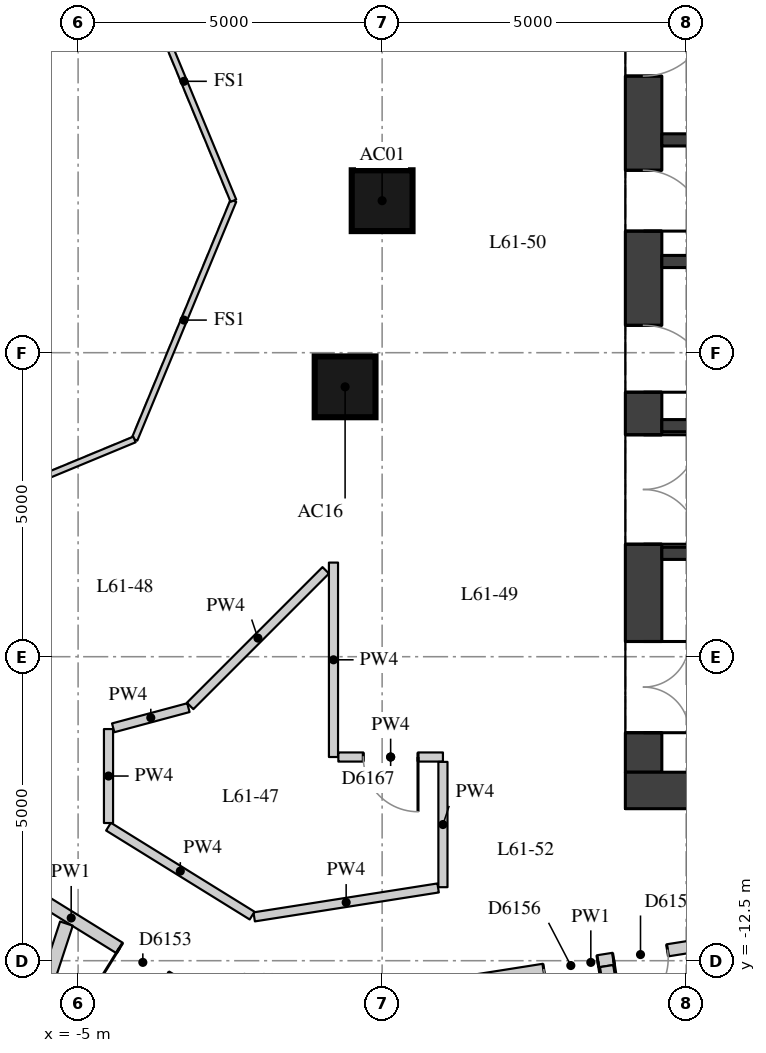
"""IFC4 building model, lengths in metres.
Left out: names, types, materials, properties, quantities, classifications, styles, units other than length and angle.
Written with IfcOpenShell. Run it as: python <this file> out.ifc"""

import sys

from ifc_helpers import new_model, si_unit, direction, frame, frame_2d, origin, origin_2d, place, context, subcontext, project, spatial, rectangle, extrude, element, fill, save


model = new_model("IFC4")
c1 = context("Model", 3, precision=1e-05, world=origin(), true_north=direction((0.0, 1.0)))
c2 = subcontext(c1, "Body", "Model", "MODEL_VIEW")
j1 = project(units=[si_unit("LENGTHUNIT", "METRE"), si_unit("PLANEANGLEUNIT", "RADIAN")], contexts=[c1])
p1 = place(None, origin())
s1 = spatial("IfcSite", under=j1, at=p1, CompositionType="ELEMENT")
p2 = place(p1, origin())
s2 = spatial("IfcBuilding", under=s1, at=p2, CompositionType="ELEMENT")
p3 = place(p2, frame((0.0, 0.0, 215.6)))
s3 = spatial("IfcBuildingStorey", under=s2, at=p3, CompositionType="ELEMENT", Elevation=215.6)
for number, where, z_axis, x_axis in (
    (1, (0.0, 0.0, 0.0), (0.0, 0.0, 1.0), (1.0, 0.0, 0.0)),
    (2, (-0.609, -3.062, 0.0), (0.0, 0.0, 1.0), (1.0, 0.0, 0.0)),
):
    element("IfcColumn", number, at=place(p3, frame(where, z_axis=z_axis, x_axis=x_axis)), inside=s3, PredefinedType="COLUMN", context=c2, shape_type="SweptSolid", body=[
        extrude(rectangle(XDim=1.0, YDim=1.0, at=origin_2d()), origin(), (0.0, 0.0, 1.0), 3.3),
    ])
p4 = place(p3, frame((4.3, -9.4, 0.0), z_axis=(0.0, 0.0, 1.0), x_axis=(0.0, 1.0, 0.0)))
e3 = element("IfcWall", 3, at=p4, inside=s3, PredefinedType="SHEAR", context=c2, shape_type="SweptSolid", body=[
    extrude(rectangle(XDim=18.8, YDim=0.6, at=frame_2d((9.4, 0.0))), origin(), (0.0, 0.0, 1.0), 3.02),
])
p5 = place(p4, frame((0.65, 0.0, 0.0)))
e4 = element("IfcOpeningElement", 4, at=p5, cuts=e3, PredefinedType="OPENING", context=c2, shape_type="SweptSolid", body=[
    extrude(rectangle(XDim=1.5, YDim=2.1, at=frame_2d((0.75, 1.05))), frame((0.0, 0.31, 0.0), z_axis=(0.0, -1.0, 0.0), x_axis=(1.0, 0.0, 0.0)), (0.0, 0.0, 1.0), 0.62),
])
p6 = place(p4, frame((3.75, 0.0, 0.0)))
e5 = element("IfcOpeningElement", 5, at=p6, cuts=e3, PredefinedType="OPENING", context=c2, shape_type="SweptSolid", body=[
    extrude(rectangle(XDim=1.8, YDim=2.1, at=frame_2d((0.9, 1.05))), frame((0.0, 0.31, 0.0), z_axis=(0.0, -1.0, 0.0), x_axis=(1.0, 0.0, 0.0)), (0.0, 0.0, 1.0), 0.62),
])
p7 = place(p4, frame((6.25, 0.0, 0.0)))
e6 = element("IfcOpeningElement", 6, at=p7, cuts=e3, PredefinedType="OPENING", context=c2, shape_type="SweptSolid", body=[
    extrude(rectangle(XDim=1.1, YDim=2.1, at=frame_2d((0.55, 1.05))), frame((0.0, 0.31, 0.0), z_axis=(0.0, -1.0, 0.0), x_axis=(1.0, 0.0, 0.0)), (0.0, 0.0, 1.0), 0.62),
])
p8 = place(p4, frame((8.9, 0.0, 0.0)))
e7 = element("IfcOpeningElement", 7, at=p8, cuts=e3, PredefinedType="OPENING", context=c2, shape_type="SweptSolid", body=[
    extrude(rectangle(XDim=1.0, YDim=2.1, at=frame_2d((0.5, 1.05))), frame((0.0, 0.31, 0.0), z_axis=(0.0, -1.0, 0.0), x_axis=(1.0, 0.0, 0.0)), (0.0, 0.0, 1.0), 0.62),
])
p9 = place(p4, frame((11.45, 0.0, 0.0)))
e8 = element("IfcOpeningElement", 8, at=p9, cuts=e3, PredefinedType="OPENING", context=c2, shape_type="SweptSolid", body=[
    extrude(rectangle(XDim=1.1, YDim=2.1, at=frame_2d((0.55, 1.05))), frame((0.0, 0.31, 0.0), z_axis=(0.0, -1.0, 0.0), x_axis=(1.0, 0.0, 0.0)), (0.0, 0.0, 1.0), 0.62),
])
p10 = place(p4, frame((13.25, 0.0, 0.0)))
e9 = element("IfcOpeningElement", 9, at=p10, cuts=e3, PredefinedType="OPENING", context=c2, shape_type="SweptSolid", body=[
    extrude(rectangle(XDim=1.8, YDim=2.1, at=frame_2d((0.9, 1.05))), frame((0.0, 0.31, 0.0), z_axis=(0.0, -1.0, 0.0), x_axis=(1.0, 0.0, 0.0)), (0.0, 0.0, 1.0), 0.62),
])
p11 = place(p4, frame((16.65, 0.0, 0.0)))
e10 = element("IfcOpeningElement", 10, at=p11, cuts=e3, PredefinedType="OPENING", context=c2, shape_type="SweptSolid", body=[
    extrude(rectangle(XDim=1.5, YDim=2.1, at=frame_2d((0.75, 1.05))), frame((0.0, 0.31, 0.0), z_axis=(0.0, -1.0, 0.0), x_axis=(1.0, 0.0, 0.0)), (0.0, 0.0, 1.0), 0.62),
])
p12 = place(p3, frame((4.0, -9.7, 0.0), z_axis=(0.0, 0.0, 1.0), x_axis=(1.0, 0.0, 0.0)))
e11 = element("IfcWall", 11, at=p12, inside=s3, PredefinedType="SHEAR", context=c2, shape_type="SweptSolid", body=[
    extrude(rectangle(XDim=12.0, YDim=0.6, at=frame_2d((6.0, 0.0))), origin(), (0.0, 0.0, 1.0), 3.02),
])
for number, where, z_axis, x_axis in (
    (12, (4.6, 1.0, 0.0), (0.0, 0.0, 1.0), (1.0, 0.0, 0.0)),
    (13, (4.6, -1.0, 0.0), (0.0, 0.0, 1.0), (1.0, 0.0, 0.0)),
):
    element("IfcWall", number, at=place(p3, frame(where, z_axis=z_axis, x_axis=x_axis)), inside=s3, PredefinedType="SHEAR", context=c2, shape_type="SweptSolid", body=[
        extrude(rectangle(XDim=10.8, YDim=0.2, at=frame_2d((5.4, 0.0))), origin(), (0.0, 0.0, 1.0), 3.02),
    ])
p13 = place(p3, frame((4.6, -3.7, 0.0), z_axis=(0.0, 0.0, 1.0), x_axis=(1.0, 0.0, 0.0)))
e14 = element("IfcWall", 14, at=p13, inside=s3, PredefinedType="SHEAR", context=c2, shape_type="SweptSolid", body=[
    extrude(rectangle(XDim=10.8, YDim=0.2, at=frame_2d((5.4, 0.0))), origin(), (0.0, 0.0, 1.0), 3.02),
])
p14 = place(p13, frame((6.6, 0.0, 0.0)))
e15 = element("IfcOpeningElement", 15, at=p14, cuts=e14, PredefinedType="OPENING", context=c2, shape_type="SweptSolid", body=[
    extrude(rectangle(XDim=1.1, YDim=2.1, at=frame_2d((0.55, 1.05))), frame((0.0, 0.11, 0.0), z_axis=(0.0, -1.0, 0.0), x_axis=(1.0, 0.0, 0.0)), (0.0, 0.0, 1.0), 0.22),
])
p15 = place(p13, frame((8.9, 0.0, 0.0)))
e16 = element("IfcOpeningElement", 16, at=p15, cuts=e14, PredefinedType="OPENING", context=c2, shape_type="SweptSolid", body=[
    extrude(rectangle(XDim=1.1, YDim=2.1, at=frame_2d((0.55, 1.05))), frame((0.0, 0.11, 0.0), z_axis=(0.0, -1.0, 0.0), x_axis=(1.0, 0.0, 0.0)), (0.0, 0.0, 1.0), 0.22),
])
p16 = place(p3, frame((4.6, -5.8, 0.0), z_axis=(0.0, 0.0, 1.0), x_axis=(1.0, 0.0, 0.0)))
e17 = element("IfcWall", 17, at=p16, inside=s3, PredefinedType="SHEAR", context=c2, shape_type="SweptSolid", body=[
    extrude(rectangle(XDim=10.8, YDim=0.2, at=frame_2d((5.4, 0.0))), origin(), (0.0, 0.0, 1.0), 3.02),
])
p17 = place(p3, frame((9.306, -11.603, 0.0), z_axis=(0.0, 0.0, 1.0), x_axis=(-0.987842562114, -0.155457622769, 0.0)))
e18 = element("IfcWall", 18, at=p17, inside=s3, PredefinedType="PARTITIONING", context=c2, shape_type="SweptSolid", body=[
    extrude(rectangle(XDim=11.893, YDim=0.2, at=frame_2d((5.947, 0.0))), origin(), (0.0, 0.0, 1.0), 3.02),
])
p18 = place(p17, frame((10.607, 0.0, 0.0)))
e19 = element("IfcOpeningElement", 19, at=p18, cuts=e18, PredefinedType="OPENING", context=c2, shape_type="SweptSolid", body=[
    extrude(rectangle(XDim=0.9, YDim=2.1, at=frame_2d((0.45, 1.05))), frame((0.0, 0.11, 0.0), z_axis=(0.0, -1.0, 0.0), x_axis=(1.0, 0.0, 0.0)), (0.0, 0.0, 1.0), 0.22),
])
p19 = place(p17, frame((5.829, 0.0, 0.0)))
e20 = element("IfcOpeningElement", 20, at=p19, cuts=e18, PredefinedType="OPENING", context=c2, shape_type="SweptSolid", body=[
    extrude(rectangle(XDim=0.9, YDim=2.1, at=frame_2d((0.45, 1.05))), frame((0.0, 0.11, 0.0), z_axis=(0.0, -1.0, 0.0), x_axis=(1.0, 0.0, 0.0)), (0.0, 0.0, 1.0), 0.22),
])
p20 = place(p17, frame((4.669, 0.0, 0.0)))
e21 = element("IfcOpeningElement", 21, at=p20, cuts=e18, PredefinedType="OPENING", context=c2, shape_type="SweptSolid", body=[
    extrude(rectangle(XDim=0.9, YDim=2.1, at=frame_2d((0.45, 1.05))), frame((0.0, 0.11, 0.0), z_axis=(0.0, -1.0, 0.0), x_axis=(1.0, 0.0, 0.0)), (0.0, 0.0, 1.0), 0.22),
])
p21 = place(p17, frame((0.14, 0.0, 0.0)))
e22 = element("IfcOpeningElement", 22, at=p21, cuts=e18, PredefinedType="OPENING", context=c2, shape_type="SweptSolid", body=[
    extrude(rectangle(XDim=1.1, YDim=2.1, at=frame_2d((0.55, 1.05))), frame((0.0, 0.11, 0.0), z_axis=(0.0, -1.0, 0.0), x_axis=(1.0, 0.0, 0.0)), (0.0, 0.0, 1.0), 0.22),
])
p22 = place(p3, frame((-2.528, -13.4, 0.0), z_axis=(0.0, 0.0, 1.0), x_axis=(-0.850088088191, 0.526640524757, 0.0)))
e23 = element("IfcWall", 23, at=p22, inside=s3, PredefinedType="PARTITIONING", context=c2, shape_type="SweptSolid", body=[
    extrude(rectangle(XDim=6.084, YDim=0.2, at=frame_2d((3.042, 0.0))), origin(), (0.0, 0.0, 1.0), 3.02),
])
p23 = place(p22, frame((4.031, 0.0, 0.0)))
e24 = element("IfcOpeningElement", 24, at=p23, cuts=e23, PredefinedType="OPENING", context=c2, shape_type="SweptSolid", body=[
    extrude(rectangle(XDim=1.1, YDim=2.1, at=frame_2d((0.55, 1.05))), frame((0.0, 0.11, 0.0), z_axis=(0.0, -1.0, 0.0), x_axis=(1.0, 0.0, 0.0)), (0.0, 0.0, 1.0), 0.22),
])
p24 = place(p22, frame((1.206, 0.0, 0.0)))
e25 = element("IfcOpeningElement", 25, at=p24, cuts=e23, PredefinedType="OPENING", context=c2, shape_type="SweptSolid", body=[
    extrude(rectangle(XDim=0.9, YDim=2.1, at=frame_2d((0.45, 1.05))), frame((0.0, 0.11, 0.0), z_axis=(0.0, -1.0, 0.0), x_axis=(1.0, 0.0, 0.0)), (0.0, 0.0, 1.0), 0.22),
])
p25 = place(p3, frame((-0.8, -5.952, 0.0), z_axis=(0.0, 0.0, 1.0), x_axis=(0.0, -1.0, 0.0)))
e26 = element("IfcWall", 26, at=p25, inside=s3, PredefinedType="PARTITIONING", context=c2, shape_type="SweptSolid", body=[
    extrude(rectangle(XDim=3.198, YDim=0.15, at=frame_2d((1.599, 0.0))), origin(), (0.0, 0.0, 1.0), 3.02),
])
p26 = place(p3, frame((-0.72, -9.15, 0.0), z_axis=(0.0, 0.0, 1.0), x_axis=(1.0, 0.0, 0.0)))
e27 = element("IfcWall", 27, at=p26, inside=s3, PredefinedType="PARTITIONING", context=c2, shape_type="SweptSolid", body=[
    extrude(rectangle(XDim=1.72, YDim=0.15, at=frame_2d((0.86, 0.0))), origin(), (0.0, 0.0, 1.0), 3.02),
])
p27 = place(p26, frame((0.41, 0.0, 0.0)))
e28 = element("IfcOpeningElement", 28, at=p27, cuts=e27, PredefinedType="OPENING", context=c2, shape_type="SweptSolid", body=[
    extrude(rectangle(XDim=0.9, YDim=2.1, at=frame_2d((0.45, 1.05))), frame((0.0, 0.085, 0.0), z_axis=(0.0, -1.0, 0.0), x_axis=(1.0, 0.0, 0.0)), (0.0, 0.0, 1.0), 0.17),
])
p28 = place(p3, frame((1.0, -9.23, 0.0), z_axis=(0.0, 0.0, 1.0), x_axis=(0.0, -1.0, 0.0)))
e29 = element("IfcWall", 29, at=p28, inside=s3, PredefinedType="PARTITIONING", context=c2, shape_type="SweptSolid", body=[
    extrude(rectangle(XDim=2.061, YDim=0.15, at=frame_2d((1.03, 0.0))), origin(), (0.0, 0.0, 1.0), 3.02),
])
p29 = place(p3, frame((0.921, -11.303, 0.0), z_axis=(0.0, 0.0, 1.0), x_axis=(-0.987854584084, -0.15538121091, 0.0)))
e30 = element("IfcWall", 30, at=p29, inside=s3, PredefinedType="PARTITIONING", context=c2, shape_type="SweptSolid", body=[
    extrude(rectangle(XDim=3.062, YDim=0.15, at=frame_2d((1.531, 0.0))), origin(), (0.0, 0.0, 1.0), 3.02),
])
p30 = place(p3, frame((-2.138, -11.758, 0.0), z_axis=(0.0, 0.0, 1.0), x_axis=(-0.850109654363, 0.526605711666, 0.0)))
e31 = element("IfcWall", 31, at=p30, inside=s3, PredefinedType="PARTITIONING", context=c2, shape_type="SweptSolid", body=[
    extrude(rectangle(XDim=2.778, YDim=0.15, at=frame_2d((1.389, 0.0))), origin(), (0.0, 0.0, 1.0), 3.02),
])
p31 = place(p3, frame((-4.5, -10.235, 0.0), z_axis=(0.0, 0.0, 1.0), x_axis=(0.0, 1.0, 0.0)))
e32 = element("IfcWall", 32, at=p31, inside=s3, PredefinedType="PARTITIONING", context=c2, shape_type="SweptSolid", body=[
    extrude(rectangle(XDim=1.545, YDim=0.15, at=frame_2d((0.772, 0.0))), origin(), (0.0, 0.0, 1.0), 3.02),
])
p32 = place(p3, frame((-4.423, -8.67, 0.0), z_axis=(0.0, 0.0, 1.0), x_axis=(0.965898680525, 0.258920333232, 0.0)))
e33 = element("IfcWall", 33, at=p32, inside=s3, PredefinedType="PARTITIONING", context=c2, shape_type="SweptSolid", body=[
    extrude(rectangle(XDim=1.281, YDim=0.15, at=frame_2d((0.64, 0.0))), origin(), (0.0, 0.0, 1.0), 3.02),
])
p33 = place(p3, frame((-3.158, -8.31, 0.0), z_axis=(0.0, 0.0, 1.0), x_axis=(0.707106781187, 0.707106781187, 0.0)))
e34 = element("IfcWall", 34, at=p33, inside=s3, PredefinedType="PARTITIONING", context=c2, shape_type="SweptSolid", body=[
    extrude(rectangle(XDim=3.154, YDim=0.15, at=frame_2d((1.577, 0.0))), origin(), (0.0, 0.0, 1.0), 3.02),
])
p34 = place(p3, frame((-7.508, -18.944, 0.0), z_axis=(0.0, 0.0, 1.0), x_axis=(0.311962912662, 0.950094280124, 0.0)))
e35 = element("IfcWall", 35, at=p34, inside=s3, PredefinedType="PARTITIONING", context=c2, shape_type="SweptSolid", body=[
    extrude(rectangle(XDim=7.425, YDim=0.22, at=frame_2d((3.712, 0.0))), origin(), (0.0, 0.0, 1.0), 3.02),
])
p35 = place(p3, frame((5.071, -21.256, 0.0), z_axis=(0.0, 0.0, 1.0), x_axis=(-0.157132312818, 0.987577559622, 0.0)))
e36 = element("IfcWall", 36, at=p35, inside=s3, PredefinedType="PARTITIONING", context=c2, shape_type="SweptSolid", body=[
    extrude(rectangle(XDim=8.777, YDim=0.22, at=frame_2d((4.389, 0.0))), origin(), (0.0, 0.0, 1.0), 3.02),
])
for number, where, z_axis, x_axis in (
    (37, (-2.446, 0.0, 0.0), (0.0, 0.0, 1.0), (-0.383, -0.924, 0.0)),
    (38, (-4.073, -3.927, 0.0), (0.0, 0.0, 1.0), (-0.924, -0.383, 0.0)),
    (39, (-4.073, 3.927, 0.0), (0.0, 0.0, 1.0), (0.383, -0.924, 0.0)),
):
    element("IfcWall", number, at=place(p3, frame(where, z_axis=z_axis, x_axis=x_axis)), inside=s3, PredefinedType="PARTITIONING", context=c2, shape_type="SweptSolid", body=[
        extrude(rectangle(XDim=4.251, YDim=0.1, at=frame_2d((2.125, 0.0))), origin(), (0.0, 0.0, 1.0), 3.02),
    ])
p36 = place(p5, origin())
e40 = element("IfcDoor", 40, at=p36, inside=s3, OperationType="DOUBLE_DOOR_SINGLE_SWING", PredefinedType="DOOR", context=c2, shape_type="SweptSolid", body=[
    extrude(rectangle(XDim=1.5, YDim=2.1, at=frame_2d((0.75, 1.05))), frame((0.0, 0.025, 0.0), z_axis=(0.0, -1.0, 0.0), x_axis=(1.0, 0.0, 0.0)), (0.0, 0.0, 1.0), 0.05),
])
fill(e4, e40)
p37 = place(p6, origin())
e41 = element("IfcDoor", 41, at=p37, inside=s3, OperationType="DOUBLE_DOOR_SINGLE_SWING", PredefinedType="DOOR", context=c2, shape_type="SweptSolid", body=[
    extrude(rectangle(XDim=1.8, YDim=2.1, at=frame_2d((0.9, 1.05))), frame((0.0, 0.025, 0.0), z_axis=(0.0, -1.0, 0.0), x_axis=(1.0, 0.0, 0.0)), (0.0, 0.0, 1.0), 0.05),
])
fill(e5, e41)
p38 = place(p7, origin())
e42 = element("IfcDoor", 42, at=p38, inside=s3, OperationType="SINGLE_SWING_RIGHT", PredefinedType="DOOR", context=c2, shape_type="SweptSolid", body=[
    extrude(rectangle(XDim=1.1, YDim=2.1, at=frame_2d((0.55, 1.05))), frame((0.0, 0.025, 0.0), z_axis=(0.0, -1.0, 0.0), x_axis=(1.0, 0.0, 0.0)), (0.0, 0.0, 1.0), 0.05),
])
fill(e6, e42)
p39 = place(p8, origin())
e43 = element("IfcDoor", 43, at=p39, inside=s3, OperationType="SINGLE_SWING_RIGHT", PredefinedType="DOOR", context=c2, shape_type="SweptSolid", body=[
    extrude(rectangle(XDim=1.0, YDim=2.1, at=frame_2d((0.5, 1.05))), frame((0.0, 0.025, 0.0), z_axis=(0.0, -1.0, 0.0), x_axis=(1.0, 0.0, 0.0)), (0.0, 0.0, 1.0), 0.05),
])
fill(e7, e43)
p40 = place(p9, origin())
e44 = element("IfcDoor", 44, at=p40, inside=s3, OperationType="SINGLE_SWING_LEFT", PredefinedType="DOOR", context=c2, shape_type="SweptSolid", body=[
    extrude(rectangle(XDim=1.1, YDim=2.1, at=frame_2d((0.55, 1.05))), frame((0.0, 0.025, 0.0), z_axis=(0.0, -1.0, 0.0), x_axis=(1.0, 0.0, 0.0)), (0.0, 0.0, 1.0), 0.05),
])
fill(e8, e44)
p41 = place(p24, origin())
e45 = element("IfcDoor", 45, at=p41, inside=s3, OperationType="SINGLE_SWING_RIGHT", PredefinedType="DOOR", context=c2, shape_type="SweptSolid", body=[
    extrude(rectangle(XDim=0.9, YDim=2.1, at=frame_2d((0.45, 1.05))), frame((0.0, 0.025, 0.0), z_axis=(0.0, -1.0, 0.0), x_axis=(1.0, 0.0, 0.0)), (0.0, 0.0, 1.0), 0.05),
])
fill(e25, e45)
p42 = place(p19, origin())
e46 = element("IfcDoor", 46, at=p42, inside=s3, OperationType="SINGLE_SWING_LEFT", PredefinedType="DOOR", context=c2, shape_type="SweptSolid", body=[
    extrude(rectangle(XDim=0.9, YDim=2.1, at=frame_2d((0.45, 1.05))), frame((0.0, 0.025, 0.0), z_axis=(0.0, -1.0, 0.0), x_axis=(1.0, 0.0, 0.0)), (0.0, 0.0, 1.0), 0.05),
])
fill(e20, e46)
p43 = place(p20, origin())
e47 = element("IfcDoor", 47, at=p43, inside=s3, OperationType="SINGLE_SWING_RIGHT", PredefinedType="DOOR", context=c2, shape_type="SweptSolid", body=[
    extrude(rectangle(XDim=0.9, YDim=2.1, at=frame_2d((0.45, 1.05))), frame((0.0, 0.025, 0.0), z_axis=(0.0, -1.0, 0.0), x_axis=(1.0, 0.0, 0.0)), (0.0, 0.0, 1.0), 0.05),
])
fill(e21, e47)
p44 = place(p27, origin())
e48 = element("IfcDoor", 48, at=p44, inside=s3, OperationType="SINGLE_SWING_LEFT", PredefinedType="DOOR", context=c2, shape_type="SweptSolid", body=[
    extrude(rectangle(XDim=0.9, YDim=2.1, at=frame_2d((0.45, 1.05))), frame((0.0, 0.025, 0.0), z_axis=(0.0, -1.0, 0.0), x_axis=(1.0, 0.0, 0.0)), (0.0, 0.0, 1.0), 0.05),
])
fill(e28, e48)
save(model, sys.argv[1])
